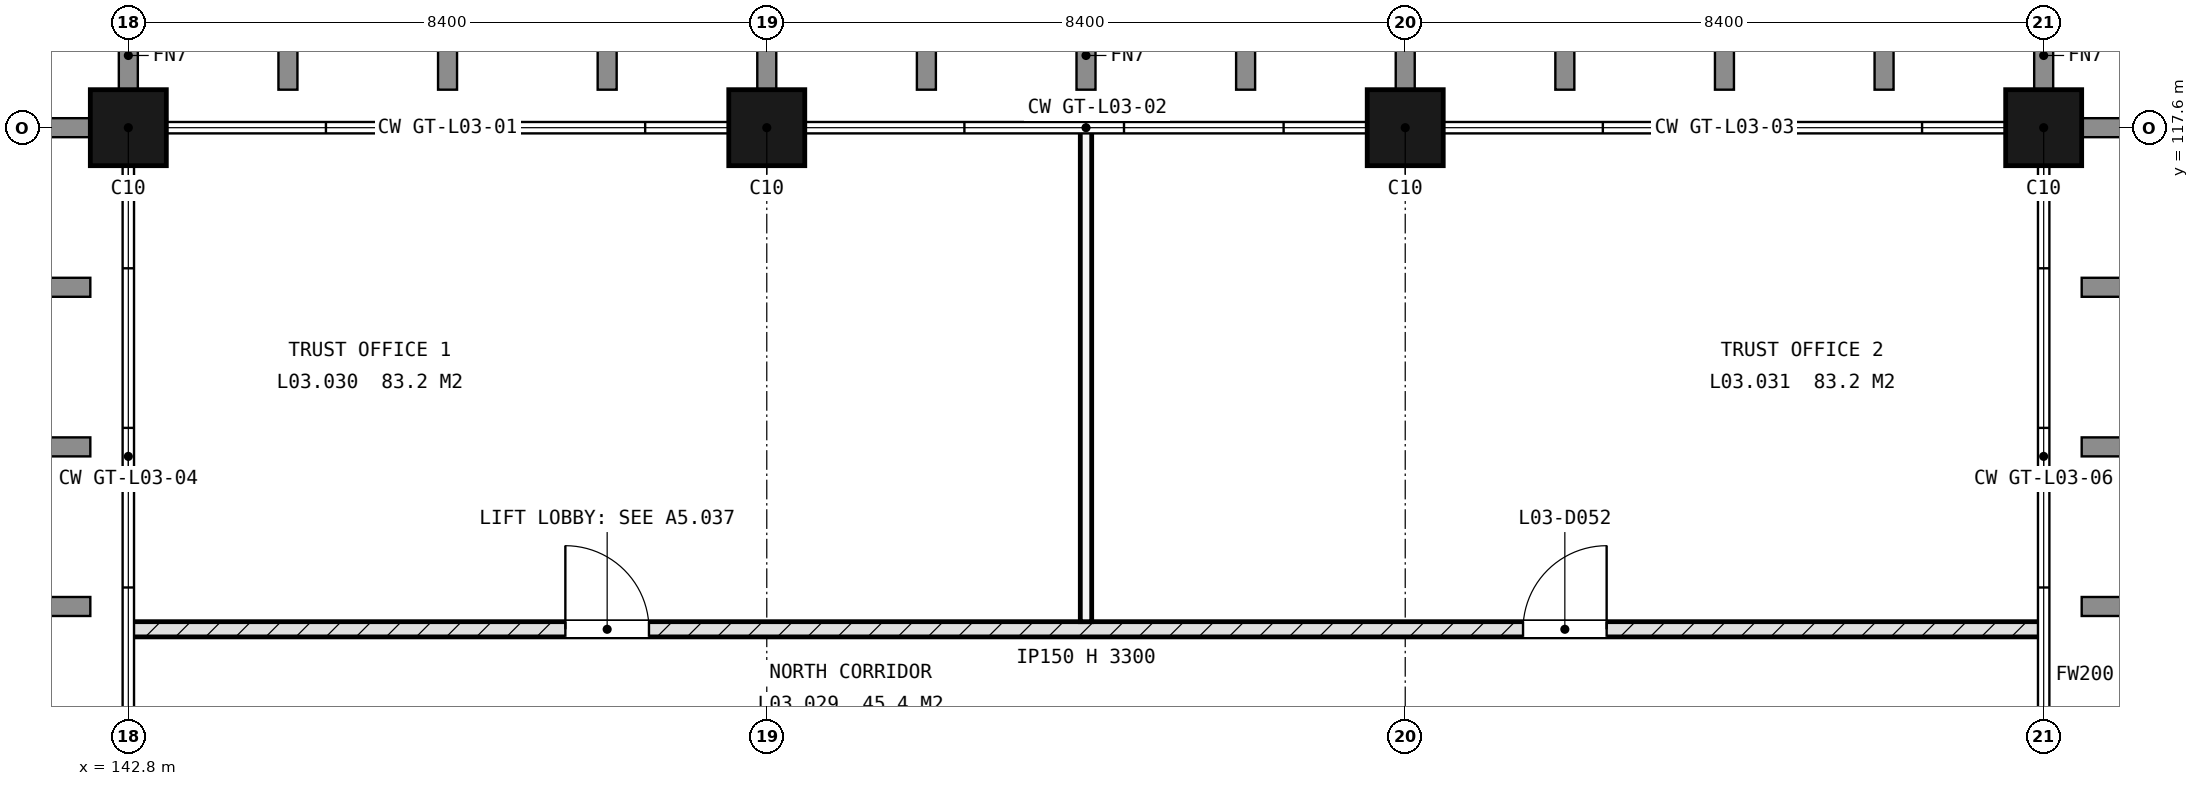
"""IFC4 building model, lengths in metres.
Left out: names, types, materials, properties, quantities, classifications, styles, units other than length and angle.
Written with IfcOpenShell. Run it as: python <this file> out.ifc"""

import sys

from ifc_helpers import new_model, si_unit, direction, frame, frame_2d, origin, origin_2d, place, context, subcontext, project, spatial, rectangle, extrude, element, fill, save


model = new_model("IFC4")
c1 = context("Model", 3, precision=1e-05, world=origin(), true_north=direction((0.0, 1.0)))
c2 = subcontext(c1, "Body", "Model", "MODEL_VIEW")
j1 = project(units=[si_unit("LENGTHUNIT", "METRE"), si_unit("PLANEANGLEUNIT", "RADIAN")], contexts=[c1])
p1 = place(None, origin())
s1 = spatial("IfcSite", under=j1, at=p1, CompositionType="ELEMENT")
p2 = place(p1, origin())
s2 = spatial("IfcBuilding", under=s1, at=p2, CompositionType="ELEMENT")
p3 = place(p2, frame((0.0, 0.0, 14.4)))
s3 = spatial("IfcBuildingStorey", under=s2, at=p3, CompositionType="ELEMENT", Elevation=14.4)
for number, where, z_axis, x_axis in (
    (1, (142.8, 117.6, -0.3), (0.0, 0.0, 1.0), (1.0, 0.0, 0.0)),
    (2, (151.2, 117.6, -0.3), (0.0, 0.0, 1.0), (1.0, 0.0, 0.0)),
    (3, (159.6, 117.6, -0.3), (0.0, 0.0, 1.0), (1.0, 0.0, 0.0)),
    (4, (168.0, 117.6, -0.3), (0.0, 0.0, 1.0), (1.0, 0.0, 0.0)),
):
    element("IfcColumn", number, at=place(p3, frame(where, z_axis=z_axis, x_axis=x_axis)), inside=s3, PredefinedType="COLUMN", context=c2, shape_type="SweptSolid", body=[
        extrude(rectangle(XDim=1.0, YDim=1.0, at=origin_2d()), origin(), (0.0, 0.0, 1.0), 3.65),
    ])
p4 = place(p3, frame((142.8, 111.0, 0.0), z_axis=(0.0, 0.0, 1.0), x_axis=(1.0, 0.0, 0.0)))
e5 = element("IfcWall", 5, at=p4, inside=s3, PredefinedType="SOLIDWALL", context=c2, shape_type="SweptSolid", body=[
    extrude(rectangle(XDim=25.2, YDim=0.2, at=frame_2d((12.6, 0.0))), origin(), (0.0, 0.0, 1.0), 3.3),
])
p5 = place(p4, frame((5.75, 0.0, 0.0)))
e6 = element("IfcOpeningElement", 6, at=p5, cuts=e5, PredefinedType="OPENING", context=c2, shape_type="SweptSolid", body=[
    extrude(rectangle(XDim=1.1, YDim=2.25, at=frame_2d((0.55, 1.125))), frame((0.0, 0.11, 0.0), z_axis=(0.0, -1.0, 0.0), x_axis=(1.0, 0.0, 0.0)), (0.0, 0.0, 1.0), 0.22),
])
p6 = place(p4, frame((18.35, 0.0, 0.0)))
e7 = element("IfcOpeningElement", 7, at=p6, cuts=e5, PredefinedType="OPENING", context=c2, shape_type="SweptSolid", body=[
    extrude(rectangle(XDim=1.1, YDim=2.25, at=frame_2d((0.55, 1.125))), frame((0.0, 0.11, 0.0), z_axis=(0.0, -1.0, 0.0), x_axis=(1.0, 0.0, 0.0)), (0.0, 0.0, 1.0), 0.22),
])
p7 = place(p3, frame((155.4, 111.1, 0.0), z_axis=(0.0, 0.0, 1.0), x_axis=(0.0, 1.0, 0.0)))
e8 = element("IfcWall", 8, at=p7, inside=s3, PredefinedType="PARTITIONING", context=c2, shape_type="SweptSolid", body=[
    extrude(rectangle(XDim=6.5, YDim=0.15, at=frame_2d((3.25, 0.0))), origin(), (0.0, 0.0, 1.0), 3.3),
])
p8 = place(p5, origin())
e9 = element("IfcDoor", 9, at=p8, inside=s3, OperationType="SINGLE_SWING_RIGHT", PredefinedType="DOOR", context=c2, shape_type="SweptSolid", body=[
    extrude(rectangle(XDim=1.1, YDim=2.25, at=frame_2d((0.55, 1.125))), frame((0.0, 0.025, 0.0), z_axis=(0.0, -1.0, 0.0), x_axis=(1.0, 0.0, 0.0)), (0.0, 0.0, 1.0), 0.05),
])
fill(e6, e9)
p9 = place(p6, origin())
e10 = element("IfcDoor", 10, at=p9, inside=s3, OperationType="SINGLE_SWING_LEFT", PredefinedType="DOOR", context=c2, shape_type="SweptSolid", body=[
    extrude(rectangle(XDim=1.1, YDim=2.25, at=frame_2d((0.55, 1.125))), frame((0.0, 0.025, 0.0), z_axis=(0.0, -1.0, 0.0), x_axis=(1.0, 0.0, 0.0)), (0.0, 0.0, 1.0), 0.05),
])
fill(e7, e10)
save(model, sys.argv[1])
